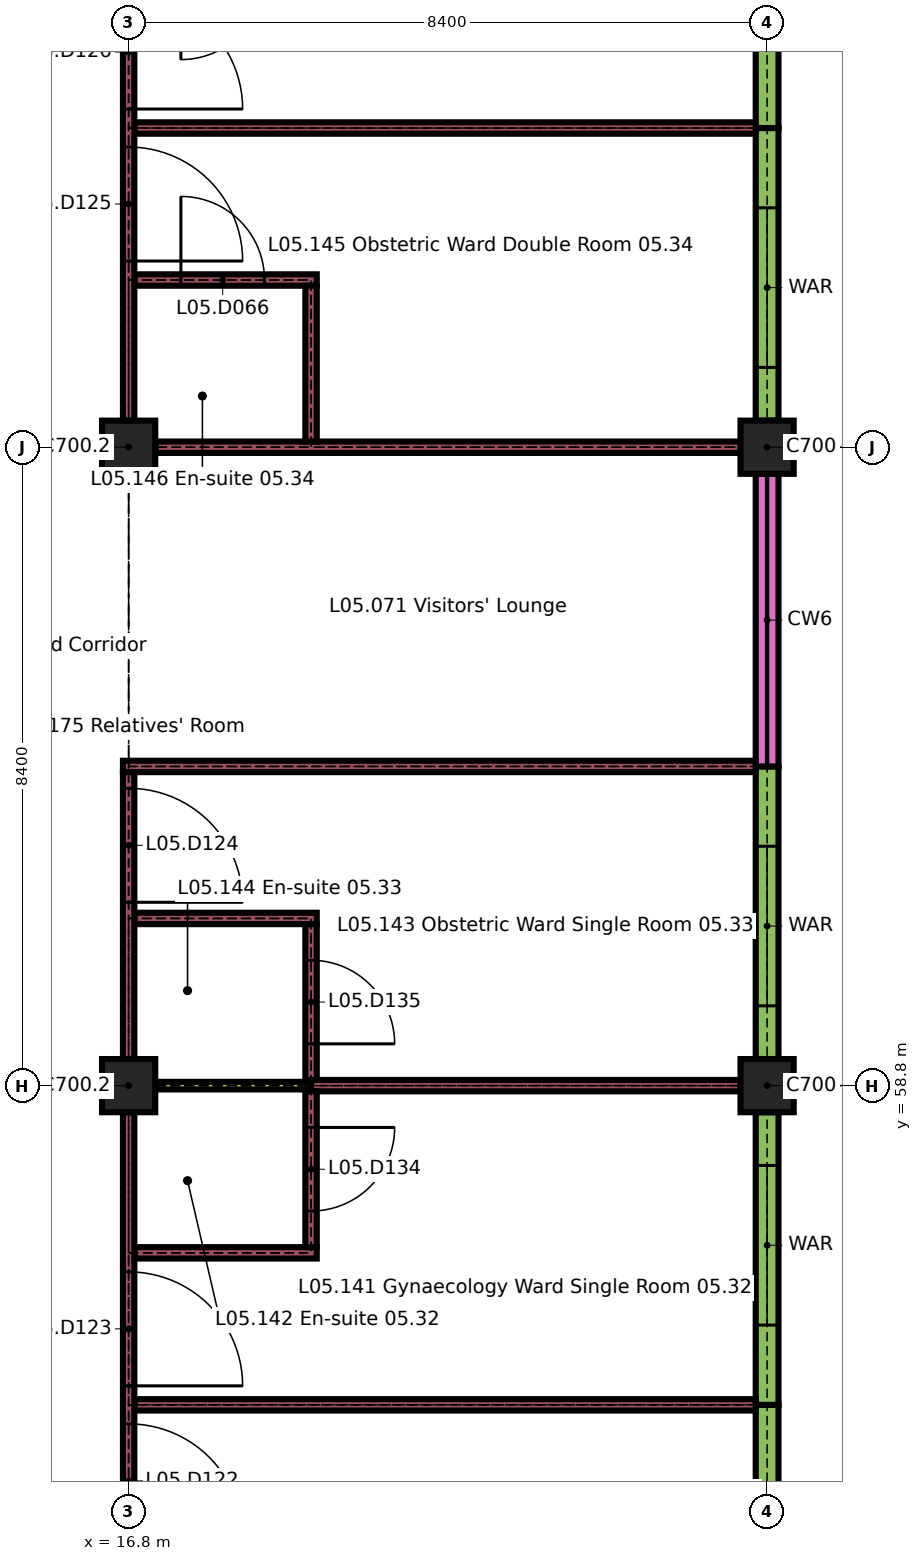
"""IFC4 building model, lengths in metres.
Left out: names, types, materials, properties, quantities, classifications, styles, units other than length and angle.
Written with IfcOpenShell. Run it as: python <this file> out.ifc"""

import sys

from ifc_helpers import new_model, si_unit, direction, frame, frame_2d, origin, origin_2d, place, context, subcontext, project, spatial, rectangle, extrude, element, fill, save


model = new_model("IFC4")
c1 = context("Model", 3, precision=1e-05, world=origin(), true_north=direction((0.0, 1.0)))
c2 = subcontext(c1, "Body", "Model", "MODEL_VIEW")
j1 = project(units=[si_unit("LENGTHUNIT", "METRE"), si_unit("PLANEANGLEUNIT", "RADIAN")], contexts=[c1])
p1 = place(None, origin())
s1 = spatial("IfcSite", under=j1, at=p1, CompositionType="ELEMENT")
p2 = place(p1, origin())
s2 = spatial("IfcBuilding", under=s1, at=p2, CompositionType="ELEMENT")
p3 = place(p2, frame((0.0, 0.0, 22.5)))
s3 = spatial("IfcBuildingStorey", under=s2, at=p3, CompositionType="ELEMENT", Elevation=22.5)
for number, where, z_axis, x_axis in (
    (1, (16.8, 58.8, 0.0), (0.0, 0.0, 1.0), (1.0, 0.0, 0.0)),
    (2, (25.2, 58.8, 0.0), (0.0, 0.0, 1.0), (1.0, 0.0, 0.0)),
    (3, (16.8, 67.2, 0.0), (0.0, 0.0, 1.0), (1.0, 0.0, 0.0)),
    (4, (25.2, 67.2, 0.0), (0.0, 0.0, 1.0), (1.0, 0.0, 0.0)),
):
    element("IfcColumn", number, at=place(p3, frame(where, z_axis=z_axis, x_axis=x_axis)), inside=s3, PredefinedType="COLUMN", context=c2, shape_type="SweptSolid", body=[
        extrude(rectangle(XDim=0.7, YDim=0.7, at=origin_2d()), origin(), (0.0, 0.0, 1.0), 3.26),
    ])
p4 = place(p3, frame((25.2, 50.4, 0.0), z_axis=(0.0, 0.0, 1.0), x_axis=(0.0, 1.0, 0.0)))
e5 = element("IfcWall", 5, at=p4, inside=s3, PredefinedType="SOLIDWALL", context=c2, shape_type="SweptSolid", body=[
    extrude(rectangle(XDim=4.2, YDim=0.3, at=frame_2d((2.1, 0.0))), origin(), (0.0, 0.0, 1.0), 2.96),
])
p5 = place(p4, frame((1.05, 0.0, 0.9)))
e6 = element("IfcOpeningElement", 6, at=p5, cuts=e5, PredefinedType="OPENING", context=c2, shape_type="SweptSolid", body=[
    extrude(rectangle(XDim=2.1, YDim=1.5, at=frame_2d((1.05, 0.75))), frame((0.0, 0.16, 0.0), z_axis=(0.0, -1.0, 0.0), x_axis=(1.0, 0.0, 0.0)), (0.0, 0.0, 1.0), 0.32),
])
p6 = place(p3, frame((25.2, 54.6, 0.0), z_axis=(0.0, 0.0, 1.0), x_axis=(0.0, 1.0, 0.0)))
e7 = element("IfcWall", 7, at=p6, inside=s3, PredefinedType="SOLIDWALL", context=c2, shape_type="SweptSolid", body=[
    extrude(rectangle(XDim=3.85, YDim=0.3, at=frame_2d((1.925, 0.0))), origin(), (0.0, 0.0, 1.0), 2.96),
])
p7 = place(p6, frame((1.05, 0.0, 0.9)))
e8 = element("IfcOpeningElement", 8, at=p7, cuts=e7, PredefinedType="OPENING", context=c2, shape_type="SweptSolid", body=[
    extrude(rectangle(XDim=2.1, YDim=1.5, at=frame_2d((1.05, 0.75))), frame((0.0, 0.16, 0.0), z_axis=(0.0, -1.0, 0.0), x_axis=(1.0, 0.0, 0.0)), (0.0, 0.0, 1.0), 0.32),
])
p8 = place(p3, frame((25.2, 59.15, 0.0), z_axis=(0.0, 0.0, 1.0), x_axis=(0.0, 1.0, 0.0)))
e9 = element("IfcWall", 9, at=p8, inside=s3, PredefinedType="SOLIDWALL", context=c2, shape_type="SweptSolid", body=[
    extrude(rectangle(XDim=3.85, YDim=0.3, at=frame_2d((1.925, 0.0))), origin(), (0.0, 0.0, 1.0), 2.96),
])
p9 = place(p8, frame((0.7, 0.0, 0.9)))
e10 = element("IfcOpeningElement", 10, at=p9, cuts=e9, PredefinedType="OPENING", context=c2, shape_type="SweptSolid", body=[
    extrude(rectangle(XDim=2.1, YDim=1.5, at=frame_2d((1.05, 0.75))), frame((0.0, 0.16, 0.0), z_axis=(0.0, -1.0, 0.0), x_axis=(1.0, 0.0, 0.0)), (0.0, 0.0, 1.0), 0.32),
])
p10 = place(p3, frame((25.2, 63.0, 0.0), z_axis=(0.0, 0.0, 1.0), x_axis=(0.0, 1.0, 0.0)))
e11 = element("IfcWall", 11, at=p10, inside=s3, PredefinedType="SOLIDWALL", context=c2, shape_type="SweptSolid", body=[
    extrude(rectangle(XDim=3.85, YDim=0.3, at=frame_2d((1.925, 0.0))), origin(), (0.0, 0.0, 1.0), 0.6),
])
p11 = place(p3, frame((25.2, 67.55, 0.0), z_axis=(0.0, 0.0, 1.0), x_axis=(0.0, 1.0, 0.0)))
e12 = element("IfcWall", 12, at=p11, inside=s3, PredefinedType="SOLIDWALL", context=c2, shape_type="SweptSolid", body=[
    extrude(rectangle(XDim=3.85, YDim=0.3, at=frame_2d((1.925, 0.0))), origin(), (0.0, 0.0, 1.0), 2.96),
])
p12 = place(p11, frame((0.7, 0.0, 0.9)))
e13 = element("IfcOpeningElement", 13, at=p12, cuts=e12, PredefinedType="OPENING", context=c2, shape_type="SweptSolid", body=[
    extrude(rectangle(XDim=2.1, YDim=1.5, at=frame_2d((1.05, 0.75))), frame((0.0, 0.16, 0.0), z_axis=(0.0, -1.0, 0.0), x_axis=(1.0, 0.0, 0.0)), (0.0, 0.0, 1.0), 0.32),
])
p13 = place(p3, frame((25.2, 71.4, 0.0), z_axis=(0.0, 0.0, 1.0), x_axis=(0.0, 1.0, 0.0)))
e14 = element("IfcWall", 14, at=p13, inside=s3, PredefinedType="SOLIDWALL", context=c2, shape_type="SweptSolid", body=[
    extrude(rectangle(XDim=4.2, YDim=0.3, at=frame_2d((2.1, 0.0))), origin(), (0.0, 0.0, 1.0), 2.96),
])
p14 = place(p13, frame((1.05, 0.0, 0.9)))
e15 = element("IfcOpeningElement", 15, at=p14, cuts=e14, PredefinedType="OPENING", context=c2, shape_type="SweptSolid", body=[
    extrude(rectangle(XDim=2.1, YDim=1.5, at=frame_2d((1.05, 0.75))), frame((0.0, 0.16, 0.0), z_axis=(0.0, -1.0, 0.0), x_axis=(1.0, 0.0, 0.0)), (0.0, 0.0, 1.0), 0.32),
])
p15 = place(p3, frame((16.875, 54.6, 0.0), z_axis=(0.0, 0.0, 1.0), x_axis=(1.0, 0.0, 0.0)))
e16 = element("IfcWall", 16, at=p15, inside=s3, PredefinedType="PARTITIONING", context=c2, shape_type="SweptSolid", body=[
    extrude(rectangle(XDim=8.175, YDim=0.15, at=frame_2d((4.087, 0.0))), origin(), (0.0, 0.0, 1.0), 3.26),
])
p16 = place(p3, frame((16.875, 56.6, 0.0), z_axis=(0.0, 0.0, 1.0), x_axis=(1.0, 0.0, 0.0)))
e17 = element("IfcWall", 17, at=p16, inside=s3, PredefinedType="PARTITIONING", context=c2, shape_type="SweptSolid", body=[
    extrude(rectangle(XDim=2.4, YDim=0.15, at=frame_2d((1.2, 0.0))), origin(), (0.0, 0.0, 1.0), 3.26),
])
p17 = place(p3, frame((17.15, 58.8, 0.0), z_axis=(0.0, 0.0, 1.0), x_axis=(1.0, 0.0, 0.0)))
e18 = element("IfcWall", 18, at=p17, inside=s3, PredefinedType="PARTITIONING", context=c2, shape_type="SweptSolid", body=[
    extrude(rectangle(XDim=2.05, YDim=0.1, at=frame_2d((1.025, 0.0))), origin(), (0.0, 0.0, 1.0), 3.26),
])
p18 = place(p3, frame((19.2, 58.8, 0.0), z_axis=(0.0, 0.0, 1.0), x_axis=(1.0, 0.0, 0.0)))
e19 = element("IfcWall", 19, at=p18, inside=s3, PredefinedType="PARTITIONING", context=c2, shape_type="SweptSolid", body=[
    extrude(rectangle(XDim=5.65, YDim=0.15, at=frame_2d((2.825, 0.0))), origin(), (0.0, 0.0, 1.0), 3.26),
])
p19 = place(p3, frame((16.875, 61.0, 0.0), z_axis=(0.0, 0.0, 1.0), x_axis=(1.0, 0.0, 0.0)))
e20 = element("IfcWall", 20, at=p19, inside=s3, PredefinedType="PARTITIONING", context=c2, shape_type="SweptSolid", body=[
    extrude(rectangle(XDim=2.4, YDim=0.15, at=frame_2d((1.2, 0.0))), origin(), (0.0, 0.0, 1.0), 3.26),
])
p20 = place(p3, frame((16.725, 63.0, 0.0), z_axis=(0.0, 0.0, 1.0), x_axis=(1.0, 0.0, 0.0)))
e21 = element("IfcWall", 21, at=p20, inside=s3, PredefinedType="PARTITIONING", context=c2, shape_type="SweptSolid", body=[
    extrude(rectangle(XDim=8.325, YDim=0.15, at=frame_2d((4.163, 0.0))), origin(), (0.0, 0.0, 1.0), 3.26),
])
p21 = place(p3, frame((17.15, 67.2, 0.0), z_axis=(0.0, 0.0, 1.0), x_axis=(1.0, 0.0, 0.0)))
e22 = element("IfcWall", 22, at=p21, inside=s3, PredefinedType="PARTITIONING", context=c2, shape_type="SweptSolid", body=[
    extrude(rectangle(XDim=7.7, YDim=0.15, at=frame_2d((3.85, 0.0))), origin(), (0.0, 0.0, 1.0), 3.26),
])
p22 = place(p3, frame((16.875, 69.4, 0.0), z_axis=(0.0, 0.0, 1.0), x_axis=(1.0, 0.0, 0.0)))
e23 = element("IfcWall", 23, at=p22, inside=s3, PredefinedType="PARTITIONING", context=c2, shape_type="SweptSolid", body=[
    extrude(rectangle(XDim=2.4, YDim=0.15, at=frame_2d((1.2, 0.0))), origin(), (0.0, 0.0, 1.0), 3.26),
])
p23 = place(p22, frame((0.613, 0.0, 0.0)))
e24 = element("IfcOpeningElement", 24, at=p23, cuts=e23, PredefinedType="OPENING", context=c2, shape_type="SweptSolid", body=[
    extrude(rectangle(XDim=1.1, YDim=2.1, at=frame_2d((0.55, 1.05))), frame((0.0, 0.085, 0.0), z_axis=(0.0, -1.0, 0.0), x_axis=(1.0, 0.0, 0.0)), (0.0, 0.0, 1.0), 0.17),
])
p24 = place(p3, frame((16.875, 71.4, 0.0), z_axis=(0.0, 0.0, 1.0), x_axis=(1.0, 0.0, 0.0)))
e25 = element("IfcWall", 25, at=p24, inside=s3, PredefinedType="PARTITIONING", context=c2, shape_type="SweptSolid", body=[
    extrude(rectangle(XDim=8.175, YDim=0.15, at=frame_2d((4.087, 0.0))), origin(), (0.0, 0.0, 1.0), 3.26),
])
p25 = place(p3, frame((16.8, 50.4, 0.0), z_axis=(0.0, 0.0, 1.0), x_axis=(0.0, 1.0, 0.0)))
e26 = element("IfcWall", 26, at=p25, inside=s3, PredefinedType="PARTITIONING", context=c2, shape_type="SweptSolid", body=[
    extrude(rectangle(XDim=8.05, YDim=0.15, at=frame_2d((4.025, 0.0))), origin(), (0.0, 0.0, 1.0), 3.26),
])
p26 = place(p25, frame((2.45, 0.0, 0.0)))
e27 = element("IfcOpeningElement", 27, at=p26, cuts=e26, PredefinedType="OPENING", context=c2, shape_type="SweptSolid", body=[
    extrude(rectangle(XDim=1.5, YDim=2.4, at=frame_2d((0.75, 1.2))), frame((0.0, 0.085, 0.0), z_axis=(0.0, -1.0, 0.0), x_axis=(1.0, 0.0, 0.0)), (0.0, 0.0, 1.0), 0.17),
])
p27 = place(p25, frame((4.45, 0.0, 0.0)))
e28 = element("IfcOpeningElement", 28, at=p27, cuts=e26, PredefinedType="OPENING", context=c2, shape_type="SweptSolid", body=[
    extrude(rectangle(XDim=1.5, YDim=2.4, at=frame_2d((0.75, 1.2))), frame((0.0, 0.085, 0.0), z_axis=(0.0, -1.0, 0.0), x_axis=(1.0, 0.0, 0.0)), (0.0, 0.0, 1.0), 0.17),
])
p28 = place(p3, frame((16.8, 59.15, 0.0), z_axis=(0.0, 0.0, 1.0), x_axis=(0.0, 1.0, 0.0)))
e29 = element("IfcWall", 29, at=p28, inside=s3, PredefinedType="PARTITIONING", context=c2, shape_type="SweptSolid", body=[
    extrude(rectangle(XDim=3.775, YDim=0.15, at=frame_2d((1.888, 0.0))), origin(), (0.0, 0.0, 1.0), 3.26),
])
p29 = place(p28, frame((2.062, 0.0, 0.0)))
e30 = element("IfcOpeningElement", 30, at=p29, cuts=e29, PredefinedType="OPENING", context=c2, shape_type="SweptSolid", body=[
    extrude(rectangle(XDim=1.5, YDim=2.4, at=frame_2d((0.75, 1.2))), frame((0.0, 0.085, 0.0), z_axis=(0.0, -1.0, 0.0), x_axis=(1.0, 0.0, 0.0)), (0.0, 0.0, 1.0), 0.17),
])
p30 = place(p3, frame((16.8, 67.55, 0.0), z_axis=(0.0, 0.0, 1.0), x_axis=(0.0, 1.0, 0.0)))
e31 = element("IfcWall", 31, at=p30, inside=s3, PredefinedType="PARTITIONING", context=c2, shape_type="SweptSolid", body=[
    extrude(rectangle(XDim=8.05, YDim=0.15, at=frame_2d((4.025, 0.0))), origin(), (0.0, 0.0, 1.0), 3.26),
])
p31 = place(p30, frame((2.1, 0.0, 0.0)))
e32 = element("IfcOpeningElement", 32, at=p31, cuts=e31, PredefinedType="OPENING", context=c2, shape_type="SweptSolid", body=[
    extrude(rectangle(XDim=1.5, YDim=2.4, at=frame_2d((0.75, 1.2))), frame((0.0, 0.085, 0.0), z_axis=(0.0, -1.0, 0.0), x_axis=(1.0, 0.0, 0.0)), (0.0, 0.0, 1.0), 0.17),
])
p32 = place(p30, frame((4.1, 0.0, 0.0)))
e33 = element("IfcOpeningElement", 33, at=p32, cuts=e31, PredefinedType="OPENING", context=c2, shape_type="SweptSolid", body=[
    extrude(rectangle(XDim=1.5, YDim=2.4, at=frame_2d((0.75, 1.2))), frame((0.0, 0.085, 0.0), z_axis=(0.0, -1.0, 0.0), x_axis=(1.0, 0.0, 0.0)), (0.0, 0.0, 1.0), 0.17),
])
p33 = place(p3, frame((19.2, 56.675, 0.0), z_axis=(0.0, 0.0, 1.0), x_axis=(0.0, 1.0, 0.0)))
e34 = element("IfcWall", 34, at=p33, inside=s3, PredefinedType="PARTITIONING", context=c2, shape_type="SweptSolid", body=[
    extrude(rectangle(XDim=2.05, YDim=0.15, at=frame_2d((1.025, 0.0))), origin(), (0.0, 0.0, 1.0), 3.26),
])
p34 = place(p33, frame((0.475, 0.0, 0.0)))
e35 = element("IfcOpeningElement", 35, at=p34, cuts=e34, PredefinedType="OPENING", context=c2, shape_type="SweptSolid", body=[
    extrude(rectangle(XDim=1.1, YDim=2.1, at=frame_2d((0.55, 1.05))), frame((0.0, 0.085, 0.0), z_axis=(0.0, -1.0, 0.0), x_axis=(1.0, 0.0, 0.0)), (0.0, 0.0, 1.0), 0.17),
])
p35 = place(p3, frame((19.2, 58.875, 0.0), z_axis=(0.0, 0.0, 1.0), x_axis=(0.0, 1.0, 0.0)))
e36 = element("IfcWall", 36, at=p35, inside=s3, PredefinedType="PARTITIONING", context=c2, shape_type="SweptSolid", body=[
    extrude(rectangle(XDim=2.05, YDim=0.15, at=frame_2d((1.025, 0.0))), origin(), (0.0, 0.0, 1.0), 3.26),
])
p36 = place(p35, frame((0.475, 0.0, 0.0)))
e37 = element("IfcOpeningElement", 37, at=p36, cuts=e36, PredefinedType="OPENING", context=c2, shape_type="SweptSolid", body=[
    extrude(rectangle(XDim=1.1, YDim=2.1, at=frame_2d((0.55, 1.05))), frame((0.0, 0.085, 0.0), z_axis=(0.0, -1.0, 0.0), x_axis=(1.0, 0.0, 0.0)), (0.0, 0.0, 1.0), 0.17),
])
p37 = place(p3, frame((19.2, 67.275, 0.0), z_axis=(0.0, 0.0, 1.0), x_axis=(0.0, 1.0, 0.0)))
e38 = element("IfcWall", 38, at=p37, inside=s3, PredefinedType="PARTITIONING", context=c2, shape_type="SweptSolid", body=[
    extrude(rectangle(XDim=2.05, YDim=0.15, at=frame_2d((1.025, 0.0))), origin(), (0.0, 0.0, 1.0), 3.26),
])
p38 = place(p7, origin())
e39 = element("IfcWindow", 39, at=p38, inside=s3, PartitioningType="DOUBLE_PANEL_VERTICAL", PredefinedType="WINDOW", context=c2, shape_type="SweptSolid", body=[
    extrude(rectangle(XDim=2.1, YDim=1.5, at=frame_2d((1.05, 0.75))), frame((0.0, 0.05, 0.0), z_axis=(0.0, -1.0, 0.0), x_axis=(1.0, 0.0, 0.0)), (0.0, 0.0, 1.0), 0.1),
])
fill(e8, e39)
p39 = place(p9, origin())
e40 = element("IfcWindow", 40, at=p39, inside=s3, PartitioningType="DOUBLE_PANEL_VERTICAL", PredefinedType="WINDOW", context=c2, shape_type="SweptSolid", body=[
    extrude(rectangle(XDim=2.1, YDim=1.5, at=frame_2d((1.05, 0.75))), frame((0.0, 0.05, 0.0), z_axis=(0.0, -1.0, 0.0), x_axis=(1.0, 0.0, 0.0)), (0.0, 0.0, 1.0), 0.1),
])
fill(e10, e40)
p40 = place(p12, origin())
e41 = element("IfcWindow", 41, at=p40, inside=s3, PartitioningType="DOUBLE_PANEL_VERTICAL", PredefinedType="WINDOW", context=c2, shape_type="SweptSolid", body=[
    extrude(rectangle(XDim=2.1, YDim=1.5, at=frame_2d((1.05, 0.75))), frame((0.0, 0.05, 0.0), z_axis=(0.0, -1.0, 0.0), x_axis=(1.0, 0.0, 0.0)), (0.0, 0.0, 1.0), 0.1),
])
fill(e13, e41)
p41 = place(p23, origin())
e42 = element("IfcDoor", 42, at=p41, inside=s3, OperationType="SINGLE_SWING_RIGHT", PredefinedType="DOOR", context=c2, shape_type="SweptSolid", body=[
    extrude(rectangle(XDim=1.1, YDim=2.1, at=frame_2d((0.55, 1.05))), frame((0.0, 0.025, 0.0), z_axis=(0.0, -1.0, 0.0), x_axis=(1.0, 0.0, 0.0)), (0.0, 0.0, 1.0), 0.05),
])
fill(e24, e42)
p42 = place(p26, origin())
e43 = element("IfcDoor", 43, at=p42, inside=s3, OperationType="SINGLE_SWING_LEFT", PredefinedType="DOOR", context=c2, shape_type="SweptSolid", body=[
    extrude(rectangle(XDim=1.5, YDim=2.4, at=frame_2d((0.75, 1.2))), frame((0.0, 0.03, 0.0), z_axis=(0.0, -1.0, 0.0), x_axis=(1.0, 0.0, 0.0)), (0.0, 0.0, 1.0), 0.06),
])
fill(e27, e43)
p43 = place(p27, origin())
e44 = element("IfcDoor", 44, at=p43, inside=s3, OperationType="SINGLE_SWING_LEFT", PredefinedType="DOOR", context=c2, shape_type="SweptSolid", body=[
    extrude(rectangle(XDim=1.5, YDim=2.4, at=frame_2d((0.75, 1.2))), frame((0.0, 0.03, 0.0), z_axis=(0.0, -1.0, 0.0), x_axis=(1.0, 0.0, 0.0)), (0.0, 0.0, 1.0), 0.06),
])
fill(e28, e44)
p44 = place(p29, origin())
e45 = element("IfcDoor", 45, at=p44, inside=s3, OperationType="SINGLE_SWING_LEFT", PredefinedType="DOOR", context=c2, shape_type="SweptSolid", body=[
    extrude(rectangle(XDim=1.5, YDim=2.4, at=frame_2d((0.75, 1.2))), frame((0.0, 0.03, 0.0), z_axis=(0.0, -1.0, 0.0), x_axis=(1.0, 0.0, 0.0)), (0.0, 0.0, 1.0), 0.06),
])
fill(e30, e45)
p45 = place(p31, origin())
e46 = element("IfcDoor", 46, at=p45, inside=s3, OperationType="SINGLE_SWING_LEFT", PredefinedType="DOOR", context=c2, shape_type="SweptSolid", body=[
    extrude(rectangle(XDim=1.5, YDim=2.4, at=frame_2d((0.75, 1.2))), frame((0.0, 0.03, 0.0), z_axis=(0.0, -1.0, 0.0), x_axis=(1.0, 0.0, 0.0)), (0.0, 0.0, 1.0), 0.06),
])
fill(e32, e46)
p46 = place(p32, origin())
e47 = element("IfcDoor", 47, at=p46, inside=s3, OperationType="SINGLE_SWING_LEFT", PredefinedType="DOOR", context=c2, shape_type="SweptSolid", body=[
    extrude(rectangle(XDim=1.5, YDim=2.4, at=frame_2d((0.75, 1.2))), frame((0.0, 0.03, 0.0), z_axis=(0.0, -1.0, 0.0), x_axis=(1.0, 0.0, 0.0)), (0.0, 0.0, 1.0), 0.06),
])
fill(e33, e47)
p47 = place(p34, origin())
e48 = element("IfcDoor", 48, at=p47, inside=s3, OperationType="SINGLE_SWING_RIGHT", PredefinedType="DOOR", context=c2, shape_type="SweptSolid", body=[
    extrude(rectangle(XDim=1.1, YDim=2.1, at=frame_2d((0.55, 1.05))), frame((0.0, 0.025, 0.0), z_axis=(0.0, -1.0, 0.0), x_axis=(1.0, 0.0, 0.0)), (0.0, 0.0, 1.0), 0.05),
])
fill(e35, e48)
p48 = place(p36, origin())
e49 = element("IfcDoor", 49, at=p48, inside=s3, OperationType="SINGLE_SWING_LEFT", PredefinedType="DOOR", context=c2, shape_type="SweptSolid", body=[
    extrude(rectangle(XDim=1.1, YDim=2.1, at=frame_2d((0.55, 1.05))), frame((0.0, 0.025, 0.0), z_axis=(0.0, -1.0, 0.0), x_axis=(1.0, 0.0, 0.0)), (0.0, 0.0, 1.0), 0.05),
])
fill(e37, e49)
save(model, sys.argv[1])
